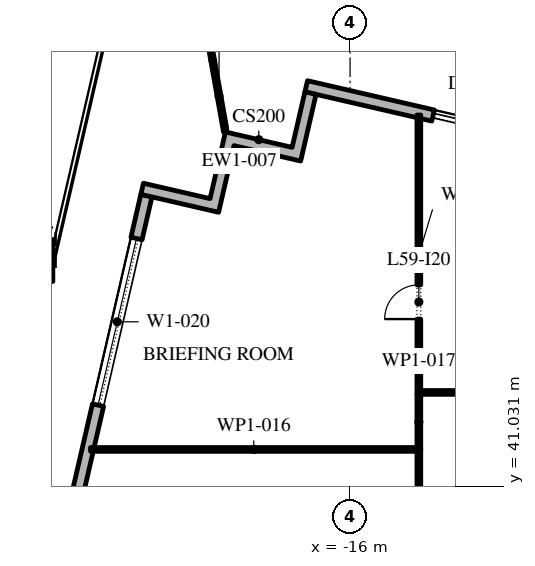
"""IFC4 building model, lengths in metres.
Left out: names, types, materials, properties, quantities, classifications, styles, units other than length and angle.
Written with IfcOpenShell. Run it as: python <this file> out.ifc"""

import sys

from ifc_helpers import new_model, si_unit, direction, frame, frame_2d, origin, origin_2d, place, context, subcontext, project, spatial, polyline, rectangle, outline, extrude, element, fill, save


model = new_model("IFC4")
c1 = context("Model", 3, precision=1e-05, world=origin(), true_north=direction((0.0, 1.0)))
c2 = subcontext(c1, "Body", "Model", "MODEL_VIEW")
j1 = project(units=[si_unit("LENGTHUNIT", "METRE"), si_unit("PLANEANGLEUNIT", "RADIAN")], contexts=[c1])
p1 = place(None, origin())
s1 = spatial("IfcSite", under=j1, at=p1, CompositionType="ELEMENT")
p2 = place(p1, origin())
s2 = spatial("IfcBuilding", under=s1, at=p2, CompositionType="ELEMENT")
p3 = place(p2, frame((0.0, 0.0, 272.4)))
s3 = spatial("IfcBuildingStorey", under=s2, at=p3, CompositionType="ELEMENT", Elevation=272.4)
p4 = place(p3, frame((-24.37, 46.97, 0.0), z_axis=(0.017443081717, 0.075683271502, 0.996979328429), x_axis=(-0.974454034257, 0.224587032398, 0.0)))
e1 = element("IfcColumn", 1, at=p4, inside=s3, PredefinedType="COLUMN", context=c2, shape_type="SweptSolid", body=[
    extrude(rectangle(XDim=1.1, YDim=1.1, at=origin_2d()), origin(), (0.0, 0.0, 1.0), 4.213),
])
p5 = place(p3, frame((29.616, 40.758, 0.0), z_axis=(0.0, 0.0, 1.0), x_axis=(-0.974370532314, 0.224949029246, 0.0)))
e2 = element("IfcWall", 2, at=p5, inside=s3, PredefinedType="STANDARD", context=c2, shape_type="SweptSolid", body=[
    extrude(rectangle(XDim=48.0, YDim=0.3, at=frame_2d((24.0, 0.0))), origin(), (0.0, 0.0, 1.0), 4.0),
])
p6 = place(p5, frame((1.625, 0.0, 0.45)))
e3 = element("IfcOpeningElement", 3, at=p6, cuts=e2, PredefinedType="OPENING", context=c2, shape_type="SweptSolid", body=[
    extrude(rectangle(XDim=4.5, YDim=2.575, at=frame_2d((2.25, 1.288))), frame((0.0, 0.16, 0.0), z_axis=(0.0, -1.0, 0.0), x_axis=(1.0, 0.0, 0.0)), (0.0, 0.0, 1.0), 0.32),
])
p7 = place(p5, frame((10.575, 0.0, 0.0)))
e4 = element("IfcOpeningElement", 4, at=p7, cuts=e2, PredefinedType="OPENING", context=c2, shape_type="SweptSolid", body=[
    extrude(rectangle(XDim=2.4, YDim=3.5, at=frame_2d((1.2, 1.75))), frame((0.0, 0.16, 0.0), z_axis=(0.0, -1.0, 0.0), x_axis=(1.0, 0.0, 0.0)), (0.0, 0.0, 1.0), 0.32),
])
p8 = place(p5, frame((17.575, 0.0, 0.45)))
e5 = element("IfcOpeningElement", 5, at=p8, cuts=e2, PredefinedType="OPENING", context=c2, shape_type="SweptSolid", body=[
    extrude(rectangle(XDim=4.5, YDim=2.45, at=frame_2d((2.25, 1.225))), frame((0.0, 0.16, 0.0), z_axis=(0.0, -1.0, 0.0), x_axis=(1.0, 0.0, 0.0)), (0.0, 0.0, 1.0), 0.32),
])
p9 = place(p5, frame((25.625, 0.0, 0.45)))
e6 = element("IfcOpeningElement", 6, at=p9, cuts=e2, PredefinedType="OPENING", context=c2, shape_type="SweptSolid", body=[
    extrude(rectangle(XDim=4.5, YDim=2.45, at=frame_2d((2.25, 1.225))), frame((0.0, 0.16, 0.0), z_axis=(0.0, -1.0, 0.0), x_axis=(1.0, 0.0, 0.0)), (0.0, 0.0, 1.0), 0.32),
])
p10 = place(p5, frame((33.675, 0.0, 0.45)))
e7 = element("IfcOpeningElement", 7, at=p10, cuts=e2, PredefinedType="OPENING", context=c2, shape_type="SweptSolid", body=[
    extrude(rectangle(XDim=4.5, YDim=2.45, at=frame_2d((2.25, 1.225))), frame((0.0, 0.16, 0.0), z_axis=(0.0, -1.0, 0.0), x_axis=(1.0, 0.0, 0.0)), (0.0, 0.0, 1.0), 0.32),
])
p11 = place(p5, frame((42.175, 0.0, 0.0)))
e8 = element("IfcOpeningElement", 8, at=p11, cuts=e2, PredefinedType="OPENING", context=c2, shape_type="SweptSolid", body=[
    extrude(rectangle(XDim=2.4, YDim=3.5, at=frame_2d((1.2, 1.75))), frame((0.0, 0.16, 0.0), z_axis=(0.0, -1.0, 0.0), x_axis=(1.0, 0.0, 0.0)), (0.0, 0.0, 1.0), 0.32),
])
p12 = place(p3, frame((-21.359, 48.678, 0.0), z_axis=(0.0, 0.0, 1.0), x_axis=(-0.224949198343, -0.974370493275, 0.0)))
e9 = element("IfcWall", 9, at=p12, inside=s3, PredefinedType="STANDARD", context=c2, shape_type="SweptSolid", body=[
    extrude(rectangle(XDim=49.5, YDim=0.3, at=frame_2d((24.75, 0.0))), origin(), (0.0, 0.0, 1.0), 4.0),
])
p13 = place(p12, frame((1.157, 0.0, 0.45)))
e10 = element("IfcOpeningElement", 10, at=p13, cuts=e9, PredefinedType="OPENING", context=c2, shape_type="SweptSolid", body=[
    extrude(rectangle(XDim=4.5, YDim=3.05, at=frame_2d((2.25, 1.525))), frame((0.0, 0.16, 0.0), z_axis=(0.0, -1.0, 0.0), x_axis=(1.0, 0.0, 0.0)), (0.0, 0.0, 1.0), 0.32),
])
p14 = place(p12, frame((9.171, 0.0, 0.0)))
e11 = element("IfcOpeningElement", 11, at=p14, cuts=e9, PredefinedType="OPENING", context=c2, shape_type="SweptSolid", body=[
    extrude(rectangle(XDim=2.4, YDim=3.5, at=frame_2d((1.2, 1.75))), frame((0.0, 0.16, 0.0), z_axis=(0.0, -1.0, 0.0), x_axis=(1.0, 0.0, 0.0)), (0.0, 0.0, 1.0), 0.32),
])
p15 = place(p12, frame((15.236, 0.0, 0.45)))
e12 = element("IfcOpeningElement", 12, at=p15, cuts=e9, PredefinedType="OPENING", context=c2, shape_type="SweptSolid", body=[
    extrude(rectangle(XDim=4.5, YDim=3.05, at=frame_2d((2.25, 1.525))), frame((0.0, 0.16, 0.0), z_axis=(0.0, -1.0, 0.0), x_axis=(1.0, 0.0, 0.0)), (0.0, 0.0, 1.0), 0.32),
])
p16 = place(p12, frame((22.35, 0.0, 0.45)))
e13 = element("IfcOpeningElement", 13, at=p16, cuts=e9, PredefinedType="OPENING", context=c2, shape_type="SweptSolid", body=[
    extrude(rectangle(XDim=4.5, YDim=3.05, at=frame_2d((2.25, 1.525))), frame((0.0, 0.16, 0.0), z_axis=(0.0, -1.0, 0.0), x_axis=(1.0, 0.0, 0.0)), (0.0, 0.0, 1.0), 0.32),
])
p17 = place(p12, frame((29.464, 0.0, 0.45)))
e14 = element("IfcOpeningElement", 14, at=p17, cuts=e9, PredefinedType="OPENING", context=c2, shape_type="SweptSolid", body=[
    extrude(rectangle(XDim=4.5, YDim=3.05, at=frame_2d((2.25, 1.525))), frame((0.0, 0.16, 0.0), z_axis=(0.0, -1.0, 0.0), x_axis=(1.0, 0.0, 0.0)), (0.0, 0.0, 1.0), 0.32),
])
p18 = place(p12, frame((37.628, 0.0, 0.0)))
e15 = element("IfcOpeningElement", 15, at=p18, cuts=e9, PredefinedType="OPENING", context=c2, shape_type="SweptSolid", body=[
    extrude(rectangle(XDim=2.4, YDim=3.325, at=frame_2d((1.2, 1.663))), frame((0.0, 0.16, 0.0), z_axis=(0.0, -1.0, 0.0), x_axis=(1.0, 0.0, 0.0)), (0.0, 0.0, 1.0), 0.32),
])
p19 = place(p12, frame((43.693, 0.0, 0.45)))
e16 = element("IfcOpeningElement", 16, at=p19, cuts=e9, PredefinedType="OPENING", context=c2, shape_type="SweptSolid", body=[
    extrude(rectangle(XDim=4.5, YDim=2.825, at=frame_2d((2.25, 1.413))), frame((0.0, 0.16, 0.0), z_axis=(0.0, -1.0, 0.0), x_axis=(1.0, 0.0, 0.0)), (0.0, 0.0, 1.0), 0.32),
])
p20 = place(p3, origin())
e17 = element("IfcWall", 17, at=p20, inside=s3, PredefinedType="STANDARD", context=c2, shape_type="SweptSolid", body=[
    extrude(outline(polyline([(-21.505, 48.712), (-21.438, 49.004), (-19.684, 48.599), (-19.279, 50.353), (-17.525, 49.948), (-17.188, 51.41), (-16.895, 51.342), (-17.3, 49.588), (-19.054, 49.993), (-19.459, 48.24), (-21.505, 48.712)])), origin(), (0.0, 0.0, 1.0), 4.0),
])
p21 = place(p3, frame((-19.279, 50.353, -0.05), z_axis=(0.0, 0.0, 1.0), x_axis=(-0.175817153202, 0.984422840369, 0.0)))
e18 = element("IfcWall", 18, at=p21, inside=s3, PredefinedType="STANDARD", context=c2, shape_type="SweptSolid", body=[
    extrude(rectangle(XDim=1.912, YDim=0.1, at=frame_2d((0.956, 0.0))), origin(), (0.0, 0.0, 1.0), 4.05),
])
p22 = place(p3, frame((-14.19, 36.55, 0.0), z_axis=(0.0, 0.0, 1.0), x_axis=(0.0, 1.0, 0.0)))
e19 = element("IfcWall", 19, at=p22, inside=s3, PredefinedType="PARTITIONING", context=c2, shape_type="SweptSolid", body=[
    extrude(rectangle(XDim=5.5, YDim=0.1, at=frame_2d((2.75, 0.0))), origin(), (0.0, 0.0, 1.0), 4.0),
])
p23 = place(p3, frame((-14.24, 42.0, 0.0), z_axis=(0.0, 0.0, 1.0), x_axis=(-1.0, 0.0, 0.0)))
e20 = element("IfcWall", 20, at=p23, inside=s3, PredefinedType="PARTITIONING", context=c2, shape_type="SweptSolid", body=[
    extrude(rectangle(XDim=8.589, YDim=0.1, at=frame_2d((4.294, 0.0))), origin(), (0.0, 0.0, 1.0), 4.0),
])
p24 = place(p3, frame((-14.19, 42.0, 0.0), z_axis=(0.0, 0.0, 1.0), x_axis=(0.0, 1.0, 0.0)))
e21 = element("IfcWall", 21, at=p24, inside=s3, PredefinedType="PARTITIONING", context=c2, shape_type="SweptSolid", body=[
    extrude(rectangle(XDim=1.45, YDim=0.1, at=frame_2d((0.725, 0.0))), origin(), (0.0, 0.0, 1.0), 4.0),
])
p25 = place(p3, frame((-14.19, 43.45, 0.0), z_axis=(0.0, 0.0, 1.0), x_axis=(0.0, 1.0, 0.0)))
e22 = element("IfcWall", 22, at=p25, inside=s3, PredefinedType="PARTITIONING", context=c2, shape_type="SweptSolid", body=[
    extrude(rectangle(XDim=7.35, YDim=0.1, at=frame_2d((3.675, 0.0))), origin(), (0.0, 0.0, 1.0), 4.0),
])
p26 = place(p25, frame((1.98, 0.0, 0.0)))
e23 = element("IfcOpeningElement", 23, at=p26, cuts=e22, PredefinedType="OPENING", context=c2, shape_type="SweptSolid", body=[
    extrude(rectangle(XDim=0.9, YDim=2.1, at=frame_2d((0.45, 1.05))), frame((0.0, 0.06, 0.0), z_axis=(0.0, -1.0, 0.0), x_axis=(1.0, 0.0, 0.0)), (0.0, 0.0, 1.0), 0.12),
])
p27 = place(p3, frame((-14.14, 43.5, 0.0), z_axis=(0.0, 0.0, 1.0), x_axis=(1.0, 0.0, 0.0)))
e24 = element("IfcWall", 24, at=p27, inside=s3, PredefinedType="PARTITIONING", context=c2, shape_type="SweptSolid", body=[
    extrude(rectangle(XDim=8.19, YDim=0.1, at=frame_2d((4.095, 0.0))), origin(), (0.0, 0.0, 1.0), 4.0),
])
p28 = place(p3, frame((-19.615, 52.236, -0.05), z_axis=(0.0, 0.0, 1.0), x_axis=(-0.175887621159, 0.984410252244, 0.0)))
e25 = element("IfcWall", 25, at=p28, inside=s3, PredefinedType="STANDARD", context=c2, shape_type="SweptSolid", body=[
    extrude(rectangle(XDim=2.265, YDim=0.1, at=frame_2d((1.133, 0.0))), origin(), (0.0, 0.0, 1.0), 3.07),
])
p29 = place(p11, origin())
e26 = element("IfcDoor", 26, at=p29, inside=s3, OperationType="DOUBLE_DOOR_SLIDING", PredefinedType="DOOR", context=c2, shape_type="SweptSolid", body=[
    extrude(rectangle(XDim=2.4, YDim=3.5, at=frame_2d((1.2, 1.75))), frame((0.0, 0.025, 0.0), z_axis=(0.0, -1.0, 0.0), x_axis=(1.0, 0.0, 0.0)), (0.0, 0.0, 1.0), 0.05),
])
fill(e8, e26)
p30 = place(p13, origin())
e27 = element("IfcWindow", 27, at=p30, inside=s3, PartitioningType="DOUBLE_PANEL_VERTICAL", PredefinedType="WINDOW", context=c2, shape_type="SweptSolid", body=[
    extrude(rectangle(XDim=4.5, YDim=3.05, at=frame_2d((2.25, 1.525))), frame((0.0, 0.03, 0.0), z_axis=(0.0, -1.0, 0.0), x_axis=(1.0, 0.0, 0.0)), (0.0, 0.0, 1.0), 0.06),
])
fill(e10, e27)
p31 = place(p26, origin())
e28 = element("IfcDoor", 28, at=p31, inside=s3, OperationType="SINGLE_SWING_RIGHT", PredefinedType="DOOR", context=c2, shape_type="SweptSolid", body=[
    extrude(rectangle(XDim=0.9, YDim=2.1, at=frame_2d((0.45, 1.05))), frame((0.0, 0.025, 0.0), z_axis=(0.0, -1.0, 0.0), x_axis=(1.0, 0.0, 0.0)), (0.0, 0.0, 1.0), 0.05),
])
fill(e23, e28)
save(model, sys.argv[1])
